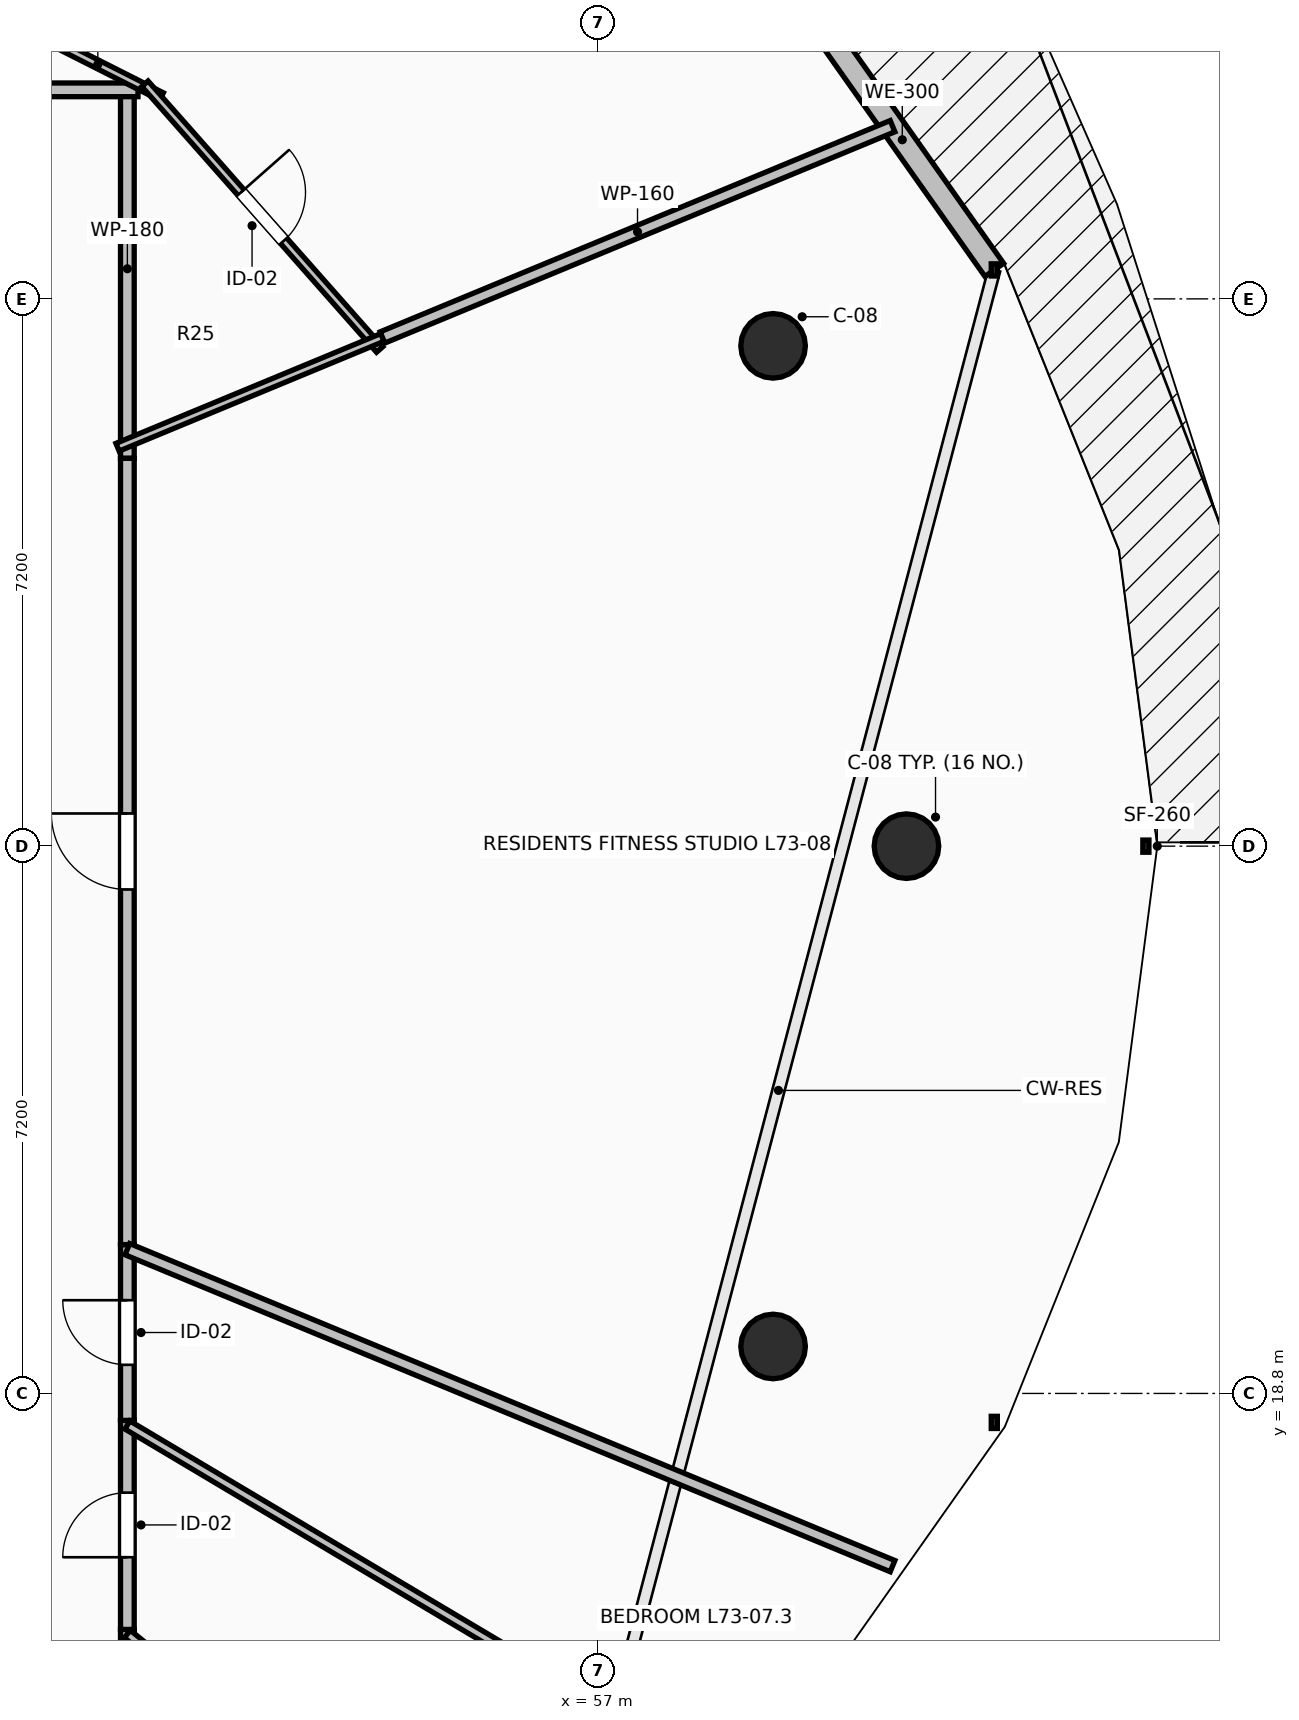
"""IFC4 building model, lengths in metres.
Left out: names, types, materials, properties, quantities, classifications, styles, units other than length and angle.
Written with IfcOpenShell. Run it as: python <this file> out.ifc"""

import sys

from ifc_helpers import new_model, si_unit, direction, frame, frame_2d, origin, origin_2d, place, context, subcontext, project, spatial, rectangle, circle, extrude, element, fill, save


model = new_model("IFC4")
c1 = context("Model", 3, precision=1e-05, world=origin(), true_north=direction((0.0, 1.0)))
c2 = subcontext(c1, "Body", "Model", "MODEL_VIEW")
j1 = project(units=[si_unit("LENGTHUNIT", "METRE"), si_unit("PLANEANGLEUNIT", "RADIAN")], contexts=[c1])
p1 = place(None, origin())
s1 = spatial("IfcSite", under=j1, at=p1, CompositionType="ELEMENT")
p2 = place(p1, origin())
s2 = spatial("IfcBuilding", under=s1, at=p2, CompositionType="ELEMENT")
p3 = place(p2, frame((0.0, 0.0, 269.75)))
s3 = spatial("IfcBuildingStorey", under=s2, at=p3, CompositionType="ELEMENT", Elevation=269.75)
for number, where, z_axis, x_axis in (
    (1, (61.05, 26.0, 0.0), (0.0, 0.0, 1.0), (1.0, 0.0, 0.0)),
    (2, (59.295, 32.582, 0.0), (0.0, 0.0, 1.0), (0.924, 0.383, 0.0)),
    (3, (59.295, 19.418, 0.0), (0.0, 0.0, 1.0), (0.924, -0.383, 0.0)),
):
    element("IfcColumn", number, at=place(p3, frame(where, z_axis=z_axis, x_axis=x_axis)), inside=s3, PredefinedType="COLUMN", context=c2, shape_type="SweptSolid", body=[
        extrude(circle(Radius=0.425, at=origin_2d()), origin(), (0.0, 0.0, 1.0), 3.55),
    ])
p4 = place(p3, frame((62.206, 33.581, 0.0), z_axis=(0.0, 0.0, 1.0), x_axis=(-0.577261247247, 0.816559521668, 0.0)))
e4 = element("IfcWall", 4, at=p4, inside=s3, PredefinedType="STANDARD", context=c2, shape_type="SweptSolid", body=[
    extrude(rectangle(XDim=4.194, YDim=0.3, at=frame_2d((2.097, 0.0))), origin(), (0.0, 0.0, 1.0), 3.29),
])
p5 = place(p3, frame((50.8, 31.102, 0.0), z_axis=(0.0, 0.0, 1.0), x_axis=(0.0, 1.0, 0.0)))
e5 = element("IfcWall", 5, at=p5, inside=s3, PredefinedType="PARTITIONING", context=c2, shape_type="SweptSolid", body=[
    extrude(rectangle(XDim=4.988, YDim=0.18, at=frame_2d((2.494, 0.0))), origin(), (0.0, 0.0, 1.0), 2.482),
])
p6 = place(p3, frame((50.94, 35.95, 0.0), z_axis=(0.0, 0.0, 1.0), x_axis=(-1.0, 0.0, 0.0)))
e6 = element("IfcWall", 6, at=p6, inside=s3, PredefinedType="PARTITIONING", context=c2, shape_type="SweptSolid", body=[
    extrude(rectangle(XDim=2.056, YDim=0.18, at=frame_2d((1.028, 0.0))), origin(), (0.0, 0.0, 1.0), 2.979),
])
p7 = place(p3, frame((50.8, 14.05, 0.0), z_axis=(0.0, 0.0, 1.0), x_axis=(0.0, 1.0, 0.0)))
e7 = element("IfcWall", 7, at=p7, inside=s3, PredefinedType="PARTITIONING", context=c2, shape_type="SweptSolid", body=[
    extrude(rectangle(XDim=1.645, YDim=0.18, at=frame_2d((0.823, 0.0))), origin(), (0.0, 0.0, 1.0), 2.482),
])
p8 = place(p3, frame((50.8, 15.695, 0.0), z_axis=(0.0, 0.0, 1.0), x_axis=(0.0, 1.0, 0.0)))
e8 = element("IfcWall", 8, at=p8, inside=s3, PredefinedType="PARTITIONING", context=c2, shape_type="SweptSolid", body=[
    extrude(rectangle(XDim=2.75, YDim=0.18, at=frame_2d((1.375, 0.0))), origin(), (0.0, 0.0, 1.0), 2.482),
])
p9 = place(p8, frame((0.95, 0.0, 0.0)))
e9 = element("IfcOpeningElement", 9, at=p9, cuts=e8, PredefinedType="OPENING", context=c2, shape_type="SweptSolid", body=[
    extrude(rectangle(XDim=0.85, YDim=2.1, at=frame_2d((0.425, 1.05))), frame((0.0, 0.105, 0.0), z_axis=(0.0, -1.0, 0.0), x_axis=(1.0, 0.0, 0.0)), (0.0, 0.0, 1.0), 0.21),
])
p10 = place(p3, frame((50.8, 18.445, 0.0), z_axis=(0.0, 0.0, 1.0), x_axis=(0.0, 1.0, 0.0)))
e10 = element("IfcWall", 10, at=p10, inside=s3, PredefinedType="PARTITIONING", context=c2, shape_type="SweptSolid", body=[
    extrude(rectangle(XDim=2.313, YDim=0.18, at=frame_2d((1.156, 0.0))), origin(), (0.0, 0.0, 1.0), 3.29),
])
p11 = place(p10, frame((0.731, 0.0, 0.0)))
e11 = element("IfcOpeningElement", 11, at=p11, cuts=e10, PredefinedType="OPENING", context=c2, shape_type="SweptSolid", body=[
    extrude(rectangle(XDim=0.85, YDim=2.1, at=frame_2d((0.425, 1.05))), frame((0.0, 0.105, 0.0), z_axis=(0.0, -1.0, 0.0), x_axis=(1.0, 0.0, 0.0)), (0.0, 0.0, 1.0), 0.21),
])
p12 = place(p3, frame((50.8, 20.758, 0.0), z_axis=(0.0, 0.0, 1.0), x_axis=(0.0, 1.0, 0.0)))
e12 = element("IfcWall", 12, at=p12, inside=s3, PredefinedType="PARTITIONING", context=c2, shape_type="SweptSolid", body=[
    extrude(rectangle(XDim=10.344, YDim=0.18, at=frame_2d((5.172, 0.0))), origin(), (0.0, 0.0, 1.0), 2.482),
])
p13 = place(p12, frame((4.672, 0.0, 0.0)))
e13 = element("IfcOpeningElement", 13, at=p13, cuts=e12, PredefinedType="OPENING", context=c2, shape_type="SweptSolid", body=[
    extrude(rectangle(XDim=1.0, YDim=2.15, at=frame_2d((0.5, 1.075))), frame((0.0, 0.105, 0.0), z_axis=(0.0, -1.0, 0.0), x_axis=(1.0, 0.0, 0.0)), (0.0, 0.0, 1.0), 0.21),
])
p14 = place(p3, frame((48.831, 35.856, 0.0), z_axis=(0.0, 0.0, 1.0), x_axis=(0.739696022243, 0.672941152463, 0.0)))
e14 = element("IfcWall", 14, at=p14, inside=s3, PredefinedType="PARTITIONING", context=c2, shape_type="SweptSolid", body=[
    extrude(rectangle(XDim=1.313, YDim=0.11, at=frame_2d((0.656, 0.0))), origin(), (0.0, 0.0, 1.0), 2.979),
])
p15 = place(p3, frame((49.574, 36.708, 0.0), z_axis=(0.0, 0.0, 1.0), x_axis=(0.8925722309, -0.450904438464, 0.0)))
e15 = element("IfcWall", 15, at=p15, inside=s3, PredefinedType="PARTITIONING", context=c2, shape_type="SweptSolid", body=[
    extrude(rectangle(XDim=1.877, YDim=0.11, at=frame_2d((0.938, 0.0))), origin(), (0.0, 0.0, 1.0), 3.29),
])
p16 = place(p3, frame((51.031, 36.03, 0.0), z_axis=(0.0, 0.0, 1.0), x_axis=(0.662106207726, -0.749410014405, 0.0)))
e16 = element("IfcWall", 16, at=p16, inside=s3, PredefinedType="PARTITIONING", context=c2, shape_type="SweptSolid", body=[
    extrude(rectangle(XDim=4.665, YDim=0.11, at=frame_2d((2.332, 0.0))), origin(), (0.0, 0.0, 1.0), 2.482),
])
p17 = place(p16, frame((1.907, 0.0, 0.0)))
e17 = element("IfcOpeningElement", 17, at=p17, cuts=e16, PredefinedType="OPENING", context=c2, shape_type="SweptSolid", body=[
    extrude(rectangle(XDim=0.85, YDim=2.1, at=frame_2d((0.425, 1.05))), frame((0.0, 0.07, 0.0), z_axis=(0.0, -1.0, 0.0), x_axis=(1.0, 0.0, 0.0)), (0.0, 0.0, 1.0), 0.14),
])
p18 = place(p3, frame((54.156, 32.693, 0.0), z_axis=(0.0, 0.0, 1.0), x_axis=(-0.923827524065, -0.382808967736, 0.0)))
e18 = element("IfcWall", 18, at=p18, inside=s3, PredefinedType="PARTITIONING", context=c2, shape_type="SweptSolid", body=[
    extrude(rectangle(XDim=3.773, YDim=0.11, at=frame_2d((1.886, 0.0))), origin(), (0.0, 0.0, 1.0), 2.482),
])
p19 = place(p3, frame((54.156, 32.692, 0.0), z_axis=(0.0, 0.0, 1.0), x_axis=(0.923880411625, 0.382681309989, 0.0)))
e19 = element("IfcWall", 19, at=p19, inside=s3, PredefinedType="PARTITIONING", context=c2, shape_type="SweptSolid", body=[
    extrude(rectangle(XDim=7.263, YDim=0.16, at=frame_2d((3.632, 0.0))), origin(), (0.0, 0.0, 1.0), 2.482),
])
p20 = place(p3, frame((55.828, 11.563, 0.0), z_axis=(0.0, 0.0, 1.0), x_axis=(-0.777103372697, 0.62937298015, 0.0)))
e20 = element("IfcWall", 20, at=p20, inside=s3, PredefinedType="PARTITIONING", context=c2, shape_type="SweptSolid", body=[
    extrude(rectangle(XDim=6.47, YDim=0.125, at=frame_2d((3.235, 0.0))), origin(), (0.0, 0.0, 1.0), 2.482),
])
p21 = place(p3, frame((58.493, 13.808, 0.0), z_axis=(0.0, 0.0, 1.0), x_axis=(-0.859400180079, 0.511303560011, 0.0)))
e21 = element("IfcWall", 21, at=p21, inside=s3, PredefinedType="PARTITIONING", context=c2, shape_type="SweptSolid", body=[
    extrude(rectangle(XDim=8.951, YDim=0.125, at=frame_2d((4.476, 0.0))), origin(), (0.0, 0.0, 1.0), 2.874),
])
p22 = place(p3, frame((60.867, 16.528, 0.0), z_axis=(0.0, 0.0, 1.0), x_axis=(-0.923877013663, 0.382689513347, 0.0)))
e22 = element("IfcWall", 22, at=p22, inside=s3, PredefinedType="PARTITIONING", context=c2, shape_type="SweptSolid", body=[
    extrude(rectangle(XDim=10.896, YDim=0.16, at=frame_2d((5.448, 0.0))), origin(), (0.0, 0.0, 1.0), 2.874),
])
p23 = place(p13, origin())
e23 = element("IfcDoor", 23, at=p23, inside=s3, OperationType="SINGLE_SWING_RIGHT", PredefinedType="DOOR", context=c2, shape_type="SweptSolid", body=[
    extrude(rectangle(XDim=1.0, YDim=2.15, at=frame_2d((0.5, 1.075))), frame((0.0, 0.025, 0.0), z_axis=(0.0, -1.0, 0.0), x_axis=(1.0, 0.0, 0.0)), (0.0, 0.0, 1.0), 0.05),
])
fill(e13, e23)
p24 = place(p17, origin())
e24 = element("IfcDoor", 24, at=p24, inside=s3, OperationType="SINGLE_SWING_LEFT", PredefinedType="DOOR", context=c2, shape_type="SweptSolid", body=[
    extrude(rectangle(XDim=0.85, YDim=2.1, at=frame_2d((0.425, 1.05))), frame((0.0, 0.025, 0.0), z_axis=(0.0, -1.0, 0.0), x_axis=(1.0, 0.0, 0.0)), (0.0, 0.0, 1.0), 0.05),
])
fill(e17, e24)
p25 = place(p9, origin())
e25 = element("IfcDoor", 25, at=p25, inside=s3, OperationType="SINGLE_SWING_LEFT", PredefinedType="DOOR", context=c2, shape_type="SweptSolid", body=[
    extrude(rectangle(XDim=0.85, YDim=2.1, at=frame_2d((0.425, 1.05))), frame((0.0, 0.025, 0.0), z_axis=(0.0, -1.0, 0.0), x_axis=(1.0, 0.0, 0.0)), (0.0, 0.0, 1.0), 0.05),
])
fill(e9, e25)
p26 = place(p11, origin())
e26 = element("IfcDoor", 26, at=p26, inside=s3, OperationType="SINGLE_SWING_RIGHT", PredefinedType="DOOR", context=c2, shape_type="SweptSolid", body=[
    extrude(rectangle(XDim=0.85, YDim=2.1, at=frame_2d((0.425, 1.05))), frame((0.0, 0.025, 0.0), z_axis=(0.0, -1.0, 0.0), x_axis=(1.0, 0.0, 0.0)), (0.0, 0.0, 1.0), 0.05),
])
fill(e11, e26)
save(model, sys.argv[1])
